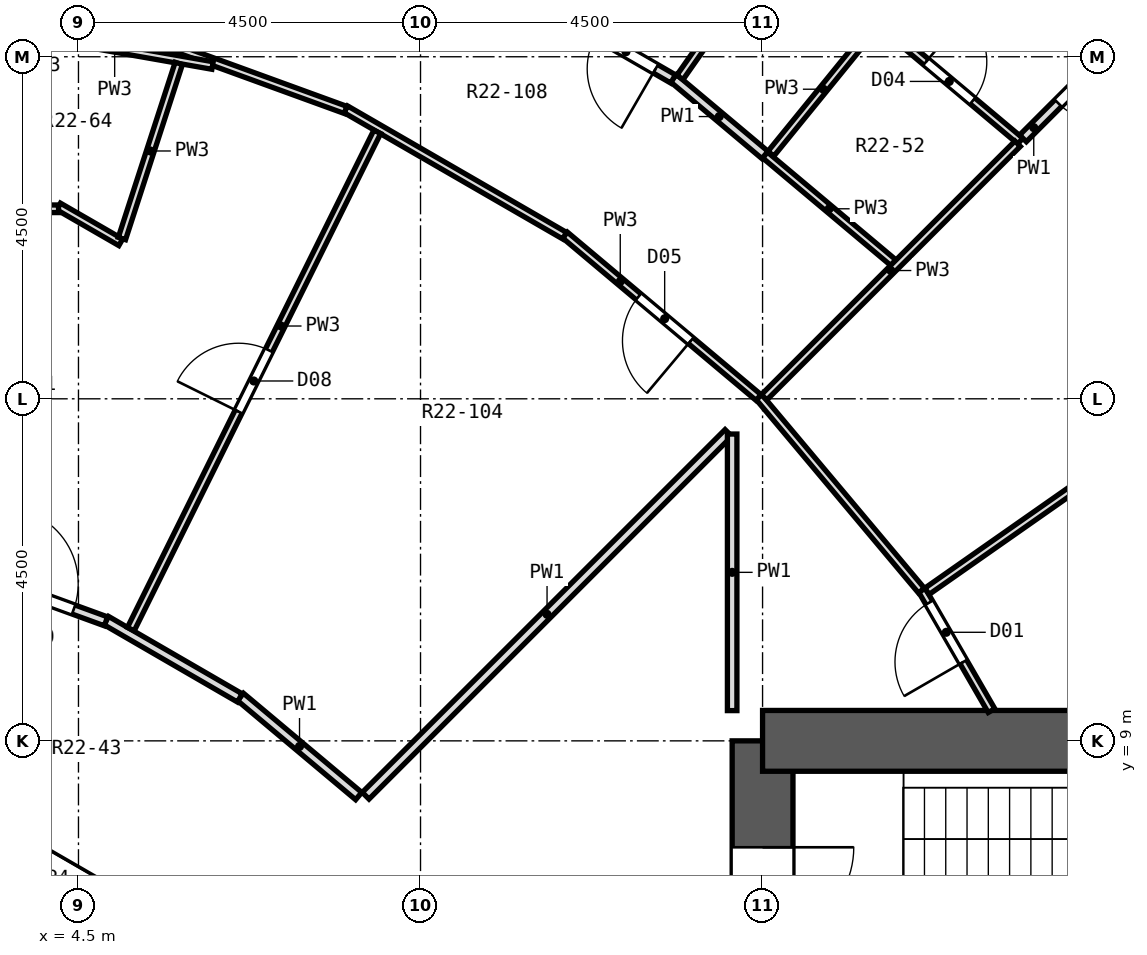
"""IFC4 building model, lengths in metres.
Left out: names, types, materials, properties, quantities, classifications, styles, units other than length and angle.
Written with IfcOpenShell. Run it as: python <this file> out.ifc"""

import sys

from ifc_helpers import new_model, si_unit, direction, frame, frame_2d, origin, place, context, subcontext, project, spatial, rectangle, extrude, element, fill, save


model = new_model("IFC4")
c1 = context("Model", 3, precision=1e-05, world=origin(), true_north=direction((0.0, 1.0)))
c2 = subcontext(c1, "Body", "Model", "MODEL_VIEW")
j1 = project(units=[si_unit("LENGTHUNIT", "METRE"), si_unit("PLANEANGLEUNIT", "RADIAN")], contexts=[c1])
p1 = place(None, origin())
s1 = spatial("IfcSite", under=j1, at=p1, CompositionType="ELEMENT")
p2 = place(p1, origin())
s2 = spatial("IfcBuilding", under=s1, at=p2, CompositionType="ELEMENT")
p3 = place(p2, frame((0.0, 0.0, 141.4)))
s3 = spatial("IfcBuildingStorey", under=s2, at=p3, CompositionType="ELEMENT", Elevation=141.4)
p4 = place(p3, frame((13.5, -9.0, 0.0), z_axis=(0.0, 0.0, 1.0), x_axis=(0.0, 1.0, 0.0)))
e1 = element("IfcWall", 1, at=p4, inside=s3, PredefinedType="SHEAR", context=c2, shape_type="SweptSolid", body=[
    extrude(rectangle(XDim=18.0, YDim=0.8, at=frame_2d((9.0, 0.0))), origin(), (0.0, 0.0, 1.0), 3.3),
])
p5 = place(p4, frame((15.4, 0.0, 0.0)))
e2 = element("IfcOpeningElement", 2, at=p5, cuts=e1, PredefinedType="OPENING", context=c2, shape_type="SweptSolid", body=[
    extrude(rectangle(XDim=1.2, YDim=2.1, at=frame_2d((0.6, 1.05))), frame((0.0, 0.412, 0.0), z_axis=(0.0, -1.0, 0.0), x_axis=(1.0, 0.0, 0.0)), (0.0, 0.0, 1.0), 0.824),
])
p6 = place(p4, frame((1.4, 0.0, 0.0)))
e3 = element("IfcOpeningElement", 3, at=p6, cuts=e1, PredefinedType="OPENING", context=c2, shape_type="SweptSolid", body=[
    extrude(rectangle(XDim=1.2, YDim=2.1, at=frame_2d((0.6, 1.05))), frame((0.0, 0.412, 0.0), z_axis=(0.0, -1.0, 0.0), x_axis=(1.0, 0.0, 0.0)), (0.0, 0.0, 1.0), 0.824),
])
p7 = place(p4, frame((7.5, 0.0, 0.0)))
e4 = element("IfcOpeningElement", 4, at=p7, cuts=e1, PredefinedType="OPENING", context=c2, shape_type="SweptSolid", body=[
    extrude(rectangle(XDim=3.0, YDim=2.4, at=frame_2d((1.5, 1.2))), frame((0.0, 0.412, 0.0), z_axis=(0.0, -1.0, 0.0), x_axis=(1.0, 0.0, 0.0)), (0.0, 0.0, 1.0), 0.824),
])
p8 = place(p3, frame((13.5, 9.0, 0.0), z_axis=(0.0, 0.0, 1.0), x_axis=(1.0, 0.0, 0.0)))
e5 = element("IfcWall", 5, at=p8, inside=s3, PredefinedType="SHEAR", context=c2, shape_type="SweptSolid", body=[
    extrude(rectangle(XDim=10.4, YDim=0.8, at=frame_2d((5.2, 0.0))), origin(), (0.0, 0.0, 1.0), 3.3),
])
p9 = place(p3, frame((5.773, 6.251, 0.0), z_axis=(0.0, 0.0, 1.0), x_axis=(-0.86604563398, 0.499964958637, 0.0)))
e6 = element("IfcWall", 6, at=p9, inside=s3, PredefinedType="SOLIDWALL", context=c2, shape_type="SweptSolid", body=[
    extrude(rectangle(XDim=3.747, YDim=0.6, at=frame_2d((1.874, 0.0))), origin(), (0.0, 0.0, 1.0), 2.8),
])
p10 = place(p9, frame((0.674, 0.0, 0.9)))
e7 = element("IfcOpeningElement", 7, at=p10, cuts=e6, PredefinedType="OPENING", context=c2, shape_type="SweptSolid", body=[
    extrude(rectangle(XDim=2.4, YDim=1.8, at=frame_2d((1.2, 0.9))), frame((0.0, 0.312, 0.0), z_axis=(0.0, -1.0, 0.0), x_axis=(1.0, 0.0, 0.0)), (0.0, 0.0, 1.0), 0.624),
])
p11 = place(p3, frame((15.597, 10.983, 0.0), z_axis=(0.0, 0.0, 1.0), x_axis=(0.500084239528, -0.865976762607, 0.0)))
e8 = element("IfcWall", 8, at=p11, inside=s3, PredefinedType="PARTITIONING", context=c2, shape_type="SweptSolid", body=[
    extrude(rectangle(XDim=1.83, YDim=0.1, at=frame_2d((0.915, 0.0))), origin(), (0.0, 0.0, 1.0), 2.8),
])
p12 = place(p11, frame((0.19, 0.0, 0.0)))
e9 = element("IfcOpeningElement", 9, at=p12, cuts=e8, PredefinedType="OPENING", context=c2, shape_type="SweptSolid", body=[
    extrude(rectangle(XDim=0.9, YDim=2.1, at=frame_2d((0.45, 1.05))), frame((0.0, 0.062, 0.0), z_axis=(0.0, -1.0, 0.0), x_axis=(1.0, 0.0, 0.0)), (0.0, 0.0, 1.0), 0.124),
])
p13 = place(p3, frame((13.452, 13.524, 0.0), z_axis=(0.0, 0.0, 1.0), x_axis=(0.642888943472, -0.765959402554, 0.0)))
e10 = element("IfcWall", 10, at=p13, inside=s3, PredefinedType="PARTITIONING", context=c2, shape_type="SweptSolid", body=[
    extrude(rectangle(XDim=3.325, YDim=0.1, at=frame_2d((1.662, 0.0))), origin(), (0.0, 0.0, 1.0), 2.8),
])
p14 = place(p3, frame((6.63, 9.579, 0.0), z_axis=(0.0, 0.0, 1.0), x_axis=(0.766246910896, -0.642546240781, 0.0)))
e11 = element("IfcWall", 11, at=p14, inside=s3, PredefinedType="PARTITIONING", context=c2, shape_type="SweptSolid", body=[
    extrude(rectangle(XDim=2.031, YDim=0.125, at=frame_2d((1.015, 0.0))), origin(), (0.0, 0.0, 1.0), 2.8),
])
p15 = place(p3, frame((10.9, 15.655, 0.0), z_axis=(0.0, 0.0, 1.0), x_axis=(0.765959402554, -0.642888943472, 0.0)))
e12 = element("IfcWall", 12, at=p15, inside=s3, PredefinedType="PARTITIONING", context=c2, shape_type="SweptSolid", body=[
    extrude(rectangle(XDim=3.325, YDim=0.1, at=frame_2d((1.662, 0.0))), origin(), (0.0, 0.0, 1.0), 2.8),
])
p16 = place(p15, frame((1.263, 0.0, 0.0)))
e13 = element("IfcOpeningElement", 13, at=p16, cuts=e12, PredefinedType="OPENING", context=c2, shape_type="SweptSolid", body=[
    extrude(rectangle(XDim=0.9, YDim=2.1, at=frame_2d((0.45, 1.05))), frame((0.0, 0.062, 0.0), z_axis=(0.0, -1.0, 0.0), x_axis=(1.0, 0.0, 0.0)), (0.0, 0.0, 1.0), 0.124),
])
p17 = place(p3, frame((13.532, 16.708, 0.0), z_axis=(0.0, 0.0, 1.0), x_axis=(0.766038513467, -0.642794676305, 0.0)))
e14 = element("IfcWall", 14, at=p17, inside=s3, PredefinedType="PARTITIONING", context=c2, shape_type="SweptSolid", body=[
    extrude(rectangle(XDim=2.205, YDim=0.1, at=frame_2d((1.103, 0.0))), origin(), (0.0, 0.0, 1.0), 2.8),
])
p18 = place(p3, frame((12.328, 17.718, 0.0), z_axis=(0.0, 0.0, 1.0), x_axis=(0.76611500949, -0.642703502585, 0.0)))
e15 = element("IfcWall", 15, at=p18, inside=s3, PredefinedType="PARTITIONING", context=c2, shape_type="SweptSolid", body=[
    extrude(rectangle(XDim=1.571, YDim=0.125, at=frame_2d((0.785, 0.0))), origin(), (0.0, 0.0, 1.0), 2.8),
])
p19 = place(p3, frame((15.022, 18.46, 0.0), z_axis=(0.0, 0.0, 1.0), x_axis=(0.765953139847, -0.642896404997, 0.0)))
e16 = element("IfcWall", 16, at=p19, inside=s3, PredefinedType="PARTITIONING", context=c2, shape_type="SweptSolid", body=[
    extrude(rectangle(XDim=2.44, YDim=0.1, at=frame_2d((1.22, 0.0))), origin(), (0.0, 0.0, 1.0), 2.8),
])
p20 = place(p19, frame((0.82, 0.0, 0.0)))
e17 = element("IfcOpeningElement", 17, at=p20, cuts=e16, PredefinedType="OPENING", context=c2, shape_type="SweptSolid", body=[
    extrude(rectangle(XDim=0.8, YDim=2.1, at=frame_2d((0.4, 1.05))), frame((0.0, 0.062, 0.0), z_axis=(0.0, -1.0, 0.0), x_axis=(1.0, 0.0, 0.0)), (0.0, 0.0, 1.0), 0.124),
])
p21 = place(p3, frame((4.865, 10.583, 0.0), z_axis=(0.0, 0.0, 1.0), x_axis=(0.865305530051, -0.50124479016, 0.0)))
e18 = element("IfcWall", 18, at=p21, inside=s3, PredefinedType="PARTITIONING", context=c2, shape_type="SweptSolid", body=[
    extrude(rectangle(XDim=2.031, YDim=0.125, at=frame_2d((1.015, 0.0))), origin(), (0.0, 0.0, 1.0), 2.8),
])
p22 = place(p3, frame((4.238, 16.031, 0.0), z_axis=(0.0, 0.0, 1.0), x_axis=(0.866215708717, -0.499670237228, 0.0)))
e19 = element("IfcWall", 19, at=p22, inside=s3, PredefinedType="PARTITIONING", context=c2, shape_type="SweptSolid", body=[
    extrude(rectangle(XDim=0.945, YDim=0.1, at=frame_2d((0.472, 0.0))), origin(), (0.0, 0.0, 1.0), 2.8),
])
p23 = place(p3, frame((8.016, 17.309, 0.0), z_axis=(0.0, 0.0, 1.0), x_axis=(0.865920199123, -0.500182175564, 0.0)))
e20 = element("IfcWall", 20, at=p23, inside=s3, PredefinedType="PARTITIONING", context=c2, shape_type="SweptSolid", body=[
    extrude(rectangle(XDim=3.325, YDim=0.1, at=frame_2d((1.663, 0.0))), origin(), (0.0, 0.0, 1.0), 2.8),
])
p24 = place(p3, frame((11.072, 18.43, 0.0), z_axis=(0.0, 0.0, 1.0), x_axis=(0.866112382925, -0.499849317439, 0.0)))
e21 = element("IfcWall", 21, at=p24, inside=s3, PredefinedType="PARTITIONING", context=c2, shape_type="SweptSolid", body=[
    extrude(rectangle(XDim=1.444, YDim=0.125, at=frame_2d((0.722, 0.0))), origin(), (0.0, 0.0, 1.0), 2.8),
])
p25 = place(p24, frame((0.278, 0.0, 0.0)))
e22 = element("IfcOpeningElement", 22, at=p25, cuts=e21, PredefinedType="OPENING", context=c2, shape_type="SweptSolid", body=[
    extrude(rectangle(XDim=0.9, YDim=2.1, at=frame_2d((0.45, 1.05))), frame((0.0, 0.074, 0.0), z_axis=(0.0, -1.0, 0.0), x_axis=(1.0, 0.0, 0.0)), (0.0, 0.0, 1.0), 0.149),
])
p26 = place(p3, frame((3.013, 11.246, 0.0), z_axis=(0.0, 0.0, 1.0), x_axis=(0.939532310436, -0.342460271633, 0.0)))
e23 = element("IfcWall", 23, at=p26, inside=s3, PredefinedType="PARTITIONING", context=c2, shape_type="SweptSolid", body=[
    extrude(rectangle(XDim=1.968, YDim=0.125, at=frame_2d((0.984, 0.0))), origin(), (0.0, 0.0, 1.0), 2.8),
])
p27 = place(p26, frame((0.515, 0.0, 0.0)))
e24 = element("IfcOpeningElement", 24, at=p27, cuts=e23, PredefinedType="OPENING", context=c2, shape_type="SweptSolid", body=[
    extrude(rectangle(XDim=1.0, YDim=2.1, at=frame_2d((0.5, 1.05))), frame((0.0, 0.074, 0.0), z_axis=(0.0, -1.0, 0.0), x_axis=(1.0, 0.0, 0.0)), (0.0, 0.0, 1.0), 0.149),
])
p28 = place(p3, frame((4.888, 18.438, 0.0), z_axis=(0.0, 0.0, 1.0), x_axis=(0.939679760884, -0.342055473549, 0.0)))
e25 = element("IfcWall", 25, at=p28, inside=s3, PredefinedType="PARTITIONING", context=c2, shape_type="SweptSolid", body=[
    extrude(rectangle(XDim=3.325, YDim=0.1, at=frame_2d((1.663, 0.0))), origin(), (0.0, 0.0, 1.0), 2.8),
])
p29 = place(p3, frame((3.688, 18.338, 0.0), z_axis=(0.0, 0.0, 1.0), x_axis=(0.984859586639, -0.173353957572, 0.0)))
e26 = element("IfcWall", 26, at=p29, inside=s3, PredefinedType="PARTITIONING", context=c2, shape_type="SweptSolid", body=[
    extrude(rectangle(XDim=2.615, YDim=0.1, at=frame_2d((1.308, 0.0))), origin(), (0.0, 0.0, 1.0), 2.8),
])
p30 = place(p3, frame((3.899, 16.0, 0.0), z_axis=(0.0, 0.0, 1.0), x_axis=(1.0, 0.0, 0.0)))
e27 = element("IfcWall", 27, at=p30, inside=s3, PredefinedType="PARTITIONING", context=c2, shape_type="SweptSolid", body=[
    extrude(rectangle(XDim=0.339, YDim=0.1, at=frame_2d((0.169, 0.0))), origin(), (0.0, 0.0, 1.0), 2.8),
])
p31 = place(p3, frame((15.663, 10.968, 0.0), z_axis=(0.0, 0.0, 1.0), x_axis=(0.8192371786, 0.573454832746, 0.0)))
e28 = element("IfcWall", 28, at=p31, inside=s3, PredefinedType="PARTITIONING", context=c2, shape_type="SweptSolid", body=[
    extrude(rectangle(XDim=6.544, YDim=0.1, at=frame_2d((3.272, 0.0))), origin(), (0.0, 0.0, 1.0), 2.8),
])
p32 = place(p31, frame((3.165, 0.0, 0.0)))
e29 = element("IfcOpeningElement", 29, at=p32, cuts=e28, PredefinedType="OPENING", context=c2, shape_type="SweptSolid", body=[
    extrude(rectangle(XDim=0.9, YDim=2.1, at=frame_2d((0.45, 1.05))), frame((0.0, 0.062, 0.0), z_axis=(0.0, -1.0, 0.0), x_axis=(1.0, 0.0, 0.0)), (0.0, 0.0, 1.0), 0.124),
])
p33 = place(p3, frame((13.52, 13.52, 0.0), z_axis=(0.0, 0.0, 1.0), x_axis=(0.707106781187, 0.707106781187, 0.0)))
e30 = element("IfcWall", 30, at=p33, inside=s3, PredefinedType="PARTITIONING", context=c2, shape_type="SweptSolid", body=[
    extrude(rectangle(XDim=4.717, YDim=0.1, at=frame_2d((2.358, 0.0))), origin(), (0.0, 0.0, 1.0), 2.8),
])
p34 = place(p3, frame((8.278, 8.278, 0.0), z_axis=(0.0, 0.0, 1.0), x_axis=(0.707106781187, 0.707106781187, 0.0)))
e31 = element("IfcWall", 31, at=p34, inside=s3, PredefinedType="PARTITIONING", context=c2, shape_type="SweptSolid", body=[
    extrude(rectangle(XDim=6.75, YDim=0.125, at=frame_2d((3.375, 0.0))), origin(), (0.0, 0.0, 1.0), 2.8),
])
p35 = place(p3, frame((16.926, 16.926, 0.0), z_axis=(0.0, 0.0, 1.0), x_axis=(0.707106781187, 0.707106781187, 0.0)))
e32 = element("IfcWall", 32, at=p35, inside=s3, PredefinedType="PARTITIONING", context=c2, shape_type="SweptSolid", body=[
    extrude(rectangle(XDim=1.728, YDim=0.125, at=frame_2d((0.864, 0.0))), origin(), (0.0, 0.0, 1.0), 2.8),
])
p36 = place(p35, frame((0.655, 0.0, 0.0)))
e33 = element("IfcOpeningElement", 33, at=p36, cuts=e32, PredefinedType="OPENING", context=c2, shape_type="SweptSolid", body=[
    extrude(rectangle(XDim=0.9, YDim=2.1, at=frame_2d((0.45, 1.05))), frame((0.0, 0.074, 0.0), z_axis=(0.0, -1.0, 0.0), x_axis=(1.0, 0.0, 0.0)), (0.0, 0.0, 1.0), 0.149),
])
p37 = place(p3, frame((13.609, 16.724, 0.0), z_axis=(0.0, 0.0, 1.0), x_axis=(0.631272959342, 0.77556073315, 0.0)))
e34 = element("IfcWall", 34, at=p37, inside=s3, PredefinedType="PARTITIONING", context=c2, shape_type="SweptSolid", body=[
    extrude(rectangle(XDim=2.188, YDim=0.1, at=frame_2d((1.094, 0.0))), origin(), (0.0, 0.0, 1.0), 2.8),
])
p38 = place(p3, frame((12.413, 17.728, 0.0), z_axis=(0.0, 0.0, 1.0), x_axis=(0.573641530368, 0.819106461113, 0.0)))
e35 = element("IfcWall", 35, at=p38, inside=s3, PredefinedType="PARTITIONING", context=c2, shape_type="SweptSolid", body=[
    extrude(rectangle(XDim=4.023, YDim=0.1, at=frame_2d((2.012, 0.0))), origin(), (0.0, 0.0, 1.0), 2.8),
])
p39 = place(p3, frame((5.189, 10.47, 0.0), z_axis=(0.0, 0.0, 1.0), x_axis=(0.444040739055, 0.896006597107, 0.0)))
e36 = element("IfcWall", 36, at=p39, inside=s3, PredefinedType="PARTITIONING", context=c2, shape_type="SweptSolid", body=[
    extrude(rectangle(XDim=7.301, YDim=0.1, at=frame_2d((3.65, 0.0))), origin(), (0.0, 0.0, 1.0), 2.8),
])
p40 = place(p39, frame((3.193, 0.0, 0.0)))
e37 = element("IfcOpeningElement", 37, at=p40, cuts=e36, PredefinedType="OPENING", context=c2, shape_type="SweptSolid", body=[
    extrude(rectangle(XDim=0.9, YDim=2.1, at=frame_2d((0.45, 1.05))), frame((0.0, 0.062, 0.0), z_axis=(0.0, -1.0, 0.0), x_axis=(1.0, 0.0, 0.0)), (0.0, 0.0, 1.0), 0.124),
])
p41 = place(p3, frame((5.072, 15.609, 0.0), z_axis=(0.0, 0.0, 1.0), x_axis=(0.30874872516, 0.95114364042, 0.0)))
e38 = element("IfcWall", 38, at=p41, inside=s3, PredefinedType="PARTITIONING", context=c2, shape_type="SweptSolid", body=[
    extrude(rectangle(XDim=2.422, YDim=0.1, at=frame_2d((1.211, 0.0))), origin(), (0.0, 0.0, 1.0), 2.8),
])
p42 = place(p3, frame((13.1, 9.398, 0.0), z_axis=(0.0, 0.0, 1.0), x_axis=(0.0, 1.0, 0.0)))
e39 = element("IfcWall", 39, at=p42, inside=s3, PredefinedType="PARTITIONING", context=c2, shape_type="SweptSolid", body=[
    extrude(rectangle(XDim=3.639, YDim=0.125, at=frame_2d((1.819, 0.0))), origin(), (0.0, 0.0, 1.0), 2.8),
])
p43 = place(p10, origin())
e40 = element("IfcWindow", 40, at=p43, inside=s3, PartitioningType="SINGLE_PANEL", PredefinedType="WINDOW", context=c2, shape_type="SweptSolid", body=[
    extrude(rectangle(XDim=2.4, YDim=1.8, at=frame_2d((1.2, 0.9))), frame((0.0, -0.12, 0.0), z_axis=(0.0, -1.0, 0.0), x_axis=(1.0, 0.0, 0.0)), (0.0, 0.0, 1.0), 0.06),
])
fill(e7, e40)
p44 = place(p12, frame((0.9, 0.0, 0.0), z_axis=(0.0, 0.0, 1.0), x_axis=(-1.0, 0.0, 0.0)))
e41 = element("IfcDoor", 41, at=p44, inside=s3, OperationType="SINGLE_SWING_LEFT", PredefinedType="DOOR", context=c2, shape_type="SweptSolid", body=[
    extrude(rectangle(XDim=0.9, YDim=2.1, at=frame_2d((0.45, 1.05))), frame((0.0, 0.025, 0.0), z_axis=(0.0, -1.0, 0.0), x_axis=(1.0, 0.0, 0.0)), (0.0, 0.0, 1.0), 0.05),
])
fill(e9, e41)
p45 = place(p36, frame((0.9, 0.0, 0.0), z_axis=(0.0, 0.0, 1.0), x_axis=(-1.0, 0.0, 0.0)))
e42 = element("IfcDoor", 42, at=p45, inside=s3, OperationType="SINGLE_SWING_LEFT", PredefinedType="DOOR", context=c2, shape_type="SweptSolid", body=[
    extrude(rectangle(XDim=0.9, YDim=2.1, at=frame_2d((0.45, 1.05))), frame((0.0, 0.025, 0.0), z_axis=(0.0, -1.0, 0.0), x_axis=(1.0, 0.0, 0.0)), (0.0, 0.0, 1.0), 0.05),
])
fill(e33, e42)
p46 = place(p20, origin())
e43 = element("IfcDoor", 43, at=p46, inside=s3, OperationType="SINGLE_SWING_LEFT", PredefinedType="DOOR", context=c2, shape_type="SweptSolid", body=[
    extrude(rectangle(XDim=0.8, YDim=2.1, at=frame_2d((0.4, 1.05))), frame((0.0, 0.025, 0.0), z_axis=(0.0, -1.0, 0.0), x_axis=(1.0, 0.0, 0.0)), (0.0, 0.0, 1.0), 0.05),
])
fill(e17, e43)
p47 = place(p16, frame((0.9, 0.0, 0.0), z_axis=(0.0, 0.0, 1.0), x_axis=(-1.0, 0.0, 0.0)))
e44 = element("IfcDoor", 44, at=p47, inside=s3, OperationType="SINGLE_SWING_LEFT", PredefinedType="DOOR", context=c2, shape_type="SweptSolid", body=[
    extrude(rectangle(XDim=0.9, YDim=2.1, at=frame_2d((0.45, 1.05))), frame((0.0, 0.025, 0.0), z_axis=(0.0, -1.0, 0.0), x_axis=(1.0, 0.0, 0.0)), (0.0, 0.0, 1.0), 0.05),
])
fill(e13, e44)
p48 = place(p25, frame((0.9, 0.0, 0.0), z_axis=(0.0, 0.0, 1.0), x_axis=(-1.0, 0.0, 0.0)))
e45 = element("IfcDoor", 45, at=p48, inside=s3, OperationType="SINGLE_SWING_LEFT", PredefinedType="DOOR", context=c2, shape_type="SweptSolid", body=[
    extrude(rectangle(XDim=0.9, YDim=2.1, at=frame_2d((0.45, 1.05))), frame((0.0, 0.025, 0.0), z_axis=(0.0, -1.0, 0.0), x_axis=(1.0, 0.0, 0.0)), (0.0, 0.0, 1.0), 0.05),
])
fill(e22, e45)
p49 = place(p40, origin())
e46 = element("IfcDoor", 46, at=p49, inside=s3, OperationType="SINGLE_SWING_LEFT", PredefinedType="DOOR", context=c2, shape_type="SweptSolid", body=[
    extrude(rectangle(XDim=0.9, YDim=2.1, at=frame_2d((0.45, 1.05))), frame((0.0, 0.025, 0.0), z_axis=(0.0, -1.0, 0.0), x_axis=(1.0, 0.0, 0.0)), (0.0, 0.0, 1.0), 0.05),
])
fill(e37, e46)
p50 = place(p27, origin())
e47 = element("IfcDoor", 47, at=p50, inside=s3, OperationType="SINGLE_SWING_LEFT", PredefinedType="DOOR", context=c2, shape_type="SweptSolid", body=[
    extrude(rectangle(XDim=1.0, YDim=2.1, at=frame_2d((0.5, 1.05))), frame((0.0, 0.025, 0.0), z_axis=(0.0, -1.0, 0.0), x_axis=(1.0, 0.0, 0.0)), (0.0, 0.0, 1.0), 0.05),
])
fill(e24, e47)
p51 = place(p5, frame((1.2, 0.0, 0.0), z_axis=(0.0, 0.0, 1.0), x_axis=(-1.0, 0.0, 0.0)))
e48 = element("IfcDoor", 48, at=p51, inside=s3, OperationType="SINGLE_SWING_LEFT", PredefinedType="DOOR", context=c2, shape_type="SweptSolid", body=[
    extrude(rectangle(XDim=1.2, YDim=2.1, at=frame_2d((0.6, 1.05))), frame((0.0, 0.025, 0.0), z_axis=(0.0, -1.0, 0.0), x_axis=(1.0, 0.0, 0.0)), (0.0, 0.0, 1.0), 0.05),
])
fill(e2, e48)
save(model, sys.argv[1])
